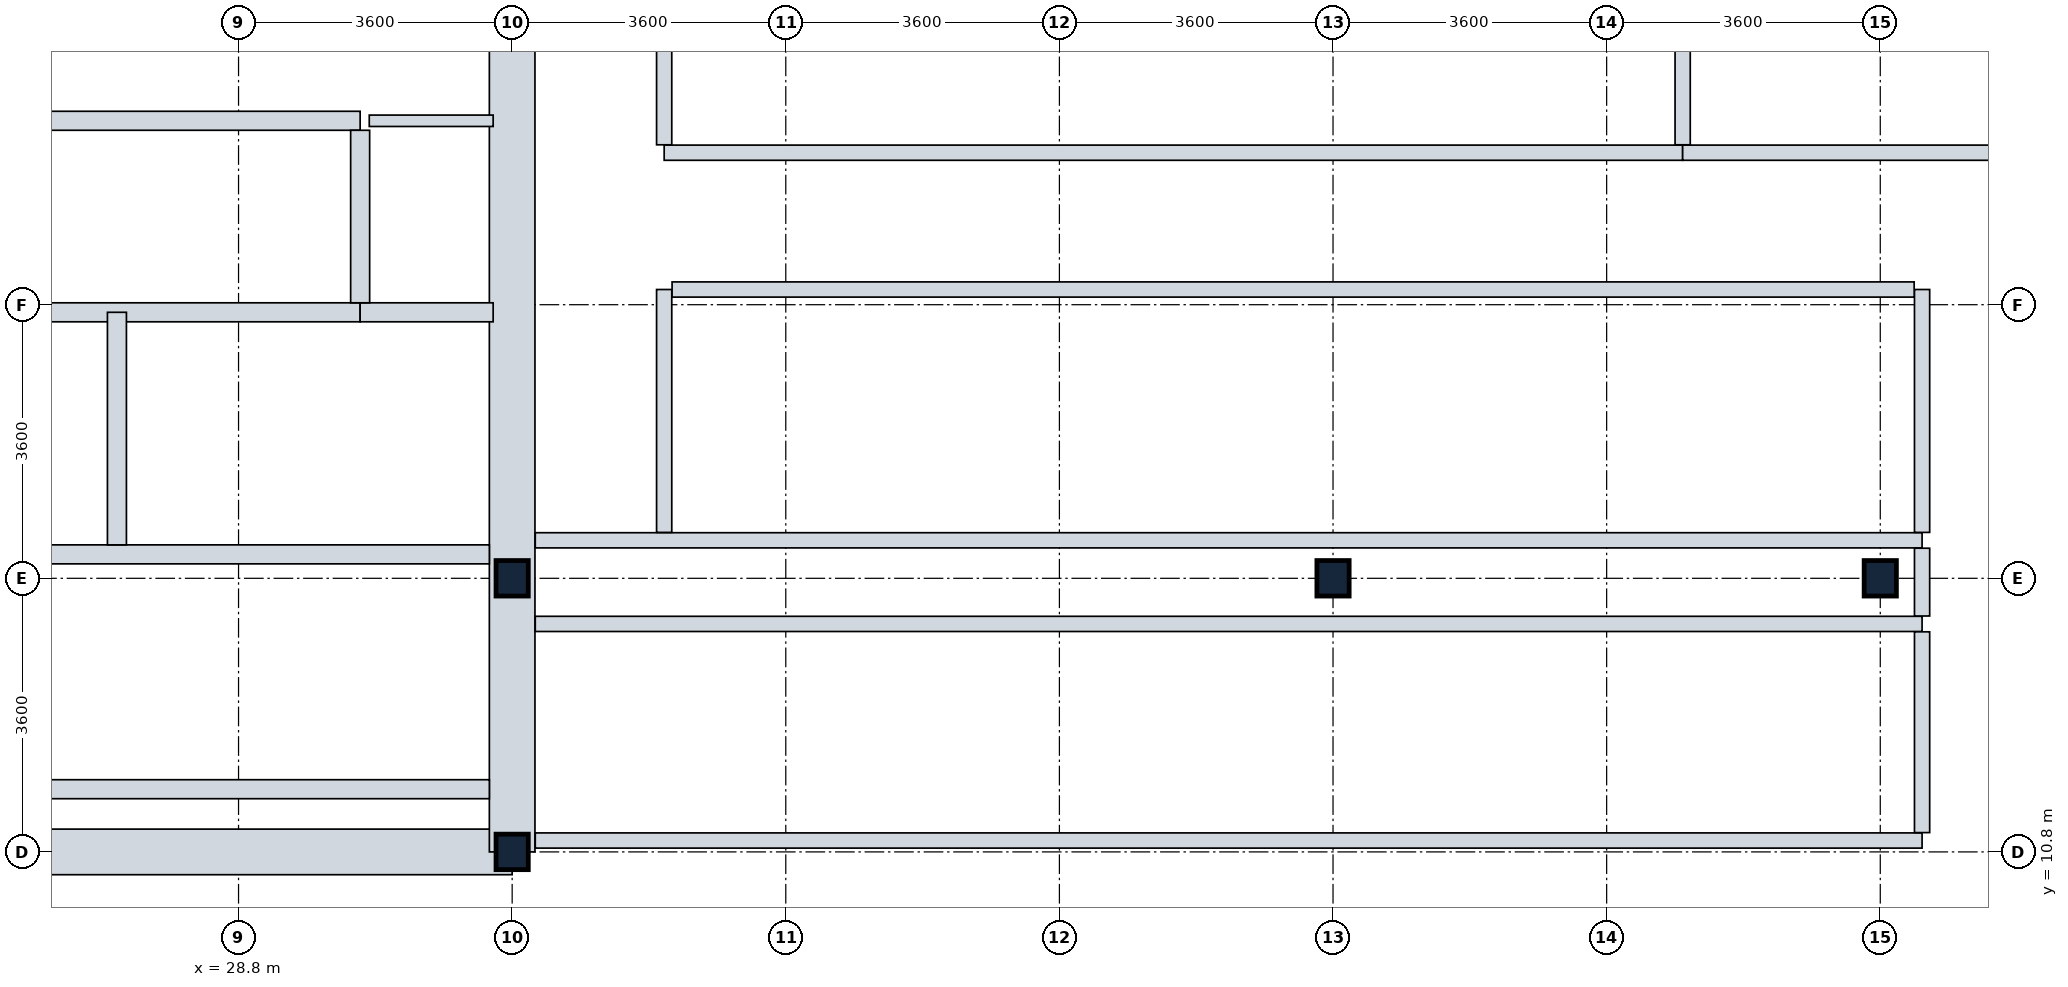
"""IFC4 building model, lengths in metres.
Left out: names, types, materials, properties, quantities, classifications, styles, units other than length and angle.
Written with IfcOpenShell. Run it as: python <this file> out.ifc"""

import sys

from ifc_helpers import new_model, si_unit, direction, frame, frame_2d, origin, origin_2d, place, context, subcontext, project, spatial, rectangle, i_section, extrude, element, fill, save


model = new_model("IFC4")
c1 = context("Model", 3, precision=1e-05, world=origin(), true_north=direction((0.0, 1.0)))
c2 = subcontext(c1, "Body", "Model", "MODEL_VIEW")
j1 = project(units=[si_unit("LENGTHUNIT", "METRE"), si_unit("PLANEANGLEUNIT", "RADIAN")], contexts=[c1])
p1 = place(None, origin())
s1 = spatial("IfcSite", under=j1, at=p1, CompositionType="ELEMENT")
p2 = place(p1, origin())
s2 = spatial("IfcBuilding", under=s1, at=p2, CompositionType="ELEMENT")
p3 = place(p2, frame((0.0, 0.0, 74.7)))
s3 = spatial("IfcBuildingStorey", under=s2, at=p3, CompositionType="ELEMENT", Elevation=74.7)
for number, where, z_axis, x_axis in (
    (1, (32.4, 10.8, 0.0), (0.0, 0.0, 1.0), (1.0, 0.0, 0.0)),
    (2, (32.4, 14.4, 0.0), (0.0, 0.0, 1.0), (1.0, 0.0, 0.0)),
    (3, (43.2, 14.4, 0.0), (0.0, 0.0, 1.0), (1.0, 0.0, 0.0)),
    (4, (50.4, 14.4, 0.0), (0.0, 0.0, 1.0), (1.0, 0.0, 0.0)),
):
    element("IfcColumn", number, at=place(p3, frame(where, z_axis=z_axis, x_axis=x_axis)), inside=s3, PredefinedType="COLUMN", context=c2, shape_type="SweptSolid", body=[
        extrude(i_section(OverallWidth=0.424, OverallDepth=0.467, WebThickness=0.033, FlangeThickness=0.053, FilletRadius=0.015, at=origin_2d()), origin(), (0.0, 0.0, 1.0), 5.4),
    ])
p4 = place(p3, frame((14.4, 10.8, 0.0), z_axis=(0.0, 0.0, 1.0), x_axis=(1.0, 0.0, 0.0)))
e5 = element("IfcWall", 5, at=p4, inside=s3, PredefinedType="SHEAR", context=c2, shape_type="SweptSolid", body=[
    extrude(rectangle(XDim=18.0, YDim=0.6, at=frame_2d((9.0, 0.0))), origin(), (0.0, 0.0, 1.0), 5.08),
])
p5 = place(p3, frame((32.4, 10.8, 0.0), z_axis=(0.0, 0.0, 1.0), x_axis=(0.0, 1.0, 0.0)))
e6 = element("IfcWall", 6, at=p5, inside=s3, PredefinedType="SHEAR", context=c2, shape_type="SweptSolid", body=[
    extrude(rectangle(XDim=14.4, YDim=0.6, at=frame_2d((7.2, 0.0))), origin(), (0.0, 0.0, 1.0), 5.08),
])
p6 = place(p5, frame((4.35, 0.0, 0.0)))
e7 = element("IfcOpeningElement", 7, at=p6, cuts=e6, PredefinedType="OPENING", context=c2, shape_type="SweptSolid", body=[
    extrude(rectangle(XDim=1.2, YDim=2.1, at=frame_2d((0.6, 1.05))), frame((0.0, 0.31, 0.0), z_axis=(0.0, -1.0, 0.0), x_axis=(1.0, 0.0, 0.0)), (0.0, 0.0, 1.0), 0.62),
])
p7 = place(p5, frame((10.0, 0.0, 0.0)))
e8 = element("IfcOpeningElement", 8, at=p7, cuts=e6, PredefinedType="OPENING", context=c2, shape_type="SweptSolid", body=[
    extrude(rectangle(XDim=1.2, YDim=2.1, at=frame_2d((0.6, 1.05))), frame((0.0, 0.31, 0.0), z_axis=(0.0, -1.0, 0.0), x_axis=(1.0, 0.0, 0.0)), (0.0, 0.0, 1.0), 0.62),
])
p8 = place(p3, frame((23.35, 11.625, 0.0), z_axis=(0.0, 0.0, 1.0), x_axis=(1.0, 0.0, 0.0)))
e9 = element("IfcWall", 9, at=p8, inside=s3, PredefinedType="SHEAR", context=c2, shape_type="SweptSolid", body=[
    extrude(rectangle(XDim=8.75, YDim=0.25, at=frame_2d((4.375, 0.0))), origin(), (0.0, 0.0, 1.0), 5.08),
])
p9 = place(p3, frame((23.35, 14.715, 0.0), z_axis=(0.0, 0.0, 1.0), x_axis=(1.0, 0.0, 0.0)))
e10 = element("IfcWall", 10, at=p9, inside=s3, PredefinedType="SHEAR", context=c2, shape_type="SweptSolid", body=[
    extrude(rectangle(XDim=8.75, YDim=0.25, at=frame_2d((4.375, 0.0))), origin(), (0.0, 0.0, 1.0), 5.08),
])
p10 = place(p9, frame((6.775, 0.0, 0.0)))
e11 = element("IfcOpeningElement", 11, at=p10, cuts=e10, PredefinedType="OPENING", context=c2, shape_type="SweptSolid", body=[
    extrude(rectangle(XDim=1.1, YDim=2.1, at=frame_2d((0.55, 1.05))), frame((0.0, 0.135, 0.0), z_axis=(0.0, -1.0, 0.0), x_axis=(1.0, 0.0, 0.0)), (0.0, 0.0, 1.0), 0.27),
])
p11 = place(p3, frame((21.88, 17.9, 0.0), z_axis=(0.0, 0.0, 1.0), x_axis=(1.0, 0.0, 0.0)))
e12 = element("IfcWall", 12, at=p11, inside=s3, PredefinedType="PARTITIONING", context=c2, shape_type="SweptSolid", body=[
    extrude(rectangle(XDim=8.52, YDim=0.25, at=frame_2d((4.26, 0.0))), origin(), (0.0, 0.0, 1.0), 5.065),
])
p12 = place(p3, frame((30.4, 17.9, 0.0), z_axis=(0.0, 0.0, 1.0), x_axis=(1.0, 0.0, 0.0)))
e13 = element("IfcWall", 13, at=p12, inside=s3, PredefinedType="PARTITIONING", context=c2, shape_type="SweptSolid", body=[
    extrude(rectangle(XDim=1.75, YDim=0.25, at=frame_2d((0.875, 0.0))), origin(), (0.0, 0.0, 1.0), 5.065),
])
p13 = place(p12, frame((0.32, 0.0, 0.0)))
e14 = element("IfcOpeningElement", 14, at=p13, cuts=e13, PredefinedType="OPENING", context=c2, shape_type="SweptSolid", body=[
    extrude(rectangle(XDim=1.1, YDim=2.1, at=frame_2d((0.55, 1.05))), frame((0.0, 0.135, 0.0), z_axis=(0.0, -1.0, 0.0), x_axis=(1.0, 0.0, 0.0)), (0.0, 0.0, 1.0), 0.27),
])
p14 = place(p3, frame((27.2, 14.84, 0.0), z_axis=(0.0, 0.0, 1.0), x_axis=(0.0, 1.0, 0.0)))
e15 = element("IfcWall", 15, at=p14, inside=s3, PredefinedType="PARTITIONING", context=c2, shape_type="SweptSolid", body=[
    extrude(rectangle(XDim=3.06, YDim=0.25, at=frame_2d((1.53, 0.0))), origin(), (0.0, 0.0, 1.0), 5.065),
])
p15 = place(p14, frame((0.98, 0.0, 0.0)))
e16 = element("IfcOpeningElement", 16, at=p15, cuts=e15, PredefinedType="OPENING", context=c2, shape_type="SweptSolid", body=[
    extrude(rectangle(XDim=1.1, YDim=2.1, at=frame_2d((0.55, 1.05))), frame((0.0, 0.135, 0.0), z_axis=(0.0, -1.0, 0.0), x_axis=(1.0, 0.0, 0.0)), (0.0, 0.0, 1.0), 0.27),
])
p16 = place(p3, frame((23.18, 20.42, 0.0), z_axis=(0.0, 0.0, 1.0), x_axis=(1.0, 0.0, 0.0)))
e17 = element("IfcWall", 17, at=p16, inside=s3, PredefinedType="PARTITIONING", context=c2, shape_type="SweptSolid", body=[
    extrude(rectangle(XDim=7.22, YDim=0.25, at=frame_2d((3.61, 0.0))), origin(), (0.0, 0.0, 1.0), 5.065),
])
p17 = place(p3, frame((30.4, 18.025, 0.0), z_axis=(0.0, 0.0, 1.0), x_axis=(0.0, 1.0, 0.0)))
e18 = element("IfcWall", 18, at=p17, inside=s3, PredefinedType="PARTITIONING", context=c2, shape_type="SweptSolid", body=[
    extrude(rectangle(XDim=2.27, YDim=0.25, at=frame_2d((1.135, 0.0))), origin(), (0.0, 0.0, 1.0), 5.065),
])
p18 = place(p3, frame((30.52, 20.42, 0.0), z_axis=(0.0, 0.0, 1.0), x_axis=(1.0, 0.0, 0.0)))
e19 = element("IfcWall", 19, at=p18, inside=s3, PredefinedType="PARTITIONING", context=c2, shape_type="SweptSolid", body=[
    extrude(rectangle(XDim=1.63, YDim=0.15, at=frame_2d((0.815, 0.0))), origin(), (0.0, 0.0, 1.0), 5.065),
])
p19 = place(p18, frame((0.38, 0.0, 0.0)))
e20 = element("IfcOpeningElement", 20, at=p19, cuts=e19, PredefinedType="OPENING", context=c2, shape_type="SweptSolid", body=[
    extrude(rectangle(XDim=0.85, YDim=2.1, at=frame_2d((0.425, 1.05))), frame((0.0, 0.085, 0.0), z_axis=(0.0, -1.0, 0.0), x_axis=(1.0, 0.0, 0.0)), (0.0, 0.0, 1.0), 0.17),
])
for number, where, z_axis, x_axis in (
    (21, (32.704, 13.8, 0.0), (0.0, 0.0, 1.0), (1.0, 0.0, 0.0)),
    (22, (32.704, 14.9, 0.0), (0.0, 0.0, 1.0), (1.0, 0.0, 0.0)),
):
    element("IfcWall", number, at=place(p3, frame(where, z_axis=z_axis, x_axis=x_axis)), inside=s3, PredefinedType="PARTITIONING", context=c2, shape_type="SweptSolid", body=[
        extrude(rectangle(XDim=18.246, YDim=0.2, at=frame_2d((9.123, 0.0))), origin(), (0.0, 0.0, 1.0), 3.58),
    ])
p20 = place(p3, frame((50.95, 13.904, 0.0), z_axis=(0.0, 0.0, 1.0), x_axis=(0.0, 1.0, 0.0)))
e23 = element("IfcWall", 23, at=p20, inside=s3, PredefinedType="PARTITIONING", context=c2, shape_type="SweptSolid", body=[
    extrude(rectangle(XDim=0.892, YDim=0.2, at=frame_2d((0.446, 0.0))), origin(), (0.0, 0.0, 1.0), 3.58),
])
for number, where, z_axis, x_axis in (
    (24, (34.4, 15.004, 0.0), (0.0, 0.0, 1.0), (0.0, 1.0, 0.0)),
    (25, (50.95, 15.004, 0.0), (0.0, 0.0, 1.0), (0.0, 1.0, 0.0)),
):
    element("IfcWall", number, at=place(p3, frame(where, z_axis=z_axis, x_axis=x_axis)), inside=s3, PredefinedType="PARTITIONING", context=c2, shape_type="SweptSolid", body=[
        extrude(rectangle(XDim=3.196, YDim=0.2, at=frame_2d((1.598, 0.0))), origin(), (0.0, 0.0, 1.0), 3.58),
    ])
p21 = place(p3, frame((34.504, 18.2, 0.0), z_axis=(0.0, 0.0, 1.0), x_axis=(1.0, 0.0, 0.0)))
e26 = element("IfcWall", 26, at=p21, inside=s3, PredefinedType="PARTITIONING", context=c2, shape_type="SweptSolid", body=[
    extrude(rectangle(XDim=16.342, YDim=0.2, at=frame_2d((8.171, 0.0))), origin(), (0.0, 0.0, 1.0), 4.61),
])
p22 = place(p21, frame((7.631, 0.0, 0.0)))
e27 = element("IfcOpeningElement", 27, at=p22, cuts=e26, PredefinedType="OPENING", context=c2, shape_type="SweptSolid", body=[
    extrude(rectangle(XDim=1.0, YDim=2.1, at=frame_2d((0.5, 1.05))), frame((0.0, 0.11, 0.0), z_axis=(0.0, -1.0, 0.0), x_axis=(1.0, 0.0, 0.0)), (0.0, 0.0, 1.0), 0.22),
])
p23 = place(p3, frame((34.4, 20.0, 0.0), z_axis=(0.0, 0.0, 1.0), x_axis=(1.0, 0.0, 0.0)))
e28 = element("IfcWall", 28, at=p23, inside=s3, PredefinedType="PARTITIONING", context=c2, shape_type="SweptSolid", body=[
    extrude(rectangle(XDim=13.4, YDim=0.2, at=frame_2d((6.7, 0.0))), origin(), (0.0, 0.0, 1.0), 4.61),
])
p24 = place(p23, frame((5.8, 0.0, 0.0)))
e29 = element("IfcOpeningElement", 29, at=p24, cuts=e28, PredefinedType="OPENING", context=c2, shape_type="SweptSolid", body=[
    extrude(rectangle(XDim=1.8, YDim=2.2, at=frame_2d((0.9, 1.1))), frame((0.0, 0.11, 0.0), z_axis=(0.0, -1.0, 0.0), x_axis=(1.0, 0.0, 0.0)), (0.0, 0.0, 1.0), 0.22),
])
p25 = place(p3, frame((47.8, 20.0, 0.0), z_axis=(0.0, 0.0, 1.0), x_axis=(1.0, 0.0, 0.0)))
e30 = element("IfcWall", 30, at=p25, inside=s3, PredefinedType="PARTITIONING", context=c2, shape_type="SweptSolid", body=[
    extrude(rectangle(XDim=13.246, YDim=0.2, at=frame_2d((6.623, 0.0))), origin(), (0.0, 0.0, 1.0), 3.58),
])
p26 = place(p25, frame((6.2, 0.0, 0.0)))
e31 = element("IfcOpeningElement", 31, at=p26, cuts=e30, PredefinedType="OPENING", context=c2, shape_type="SweptSolid", body=[
    extrude(rectangle(XDim=1.0, YDim=2.1, at=frame_2d((0.5, 1.05))), frame((0.0, 0.11, 0.0), z_axis=(0.0, -1.0, 0.0), x_axis=(1.0, 0.0, 0.0)), (0.0, 0.0, 1.0), 0.22),
])
p27 = place(p3, frame((34.4, 20.104, 0.0), z_axis=(0.0, 0.0, 1.0), x_axis=(0.0, 1.0, 0.0)))
e32 = element("IfcWall", 32, at=p27, inside=s3, PredefinedType="PARTITIONING", context=c2, shape_type="SweptSolid", body=[
    extrude(rectangle(XDim=4.942, YDim=0.2, at=frame_2d((2.471, 0.0))), origin(), (0.0, 0.0, 1.0), 4.43),
])
p28 = place(p3, frame((47.8, 20.104, 0.0), z_axis=(0.0, 0.0, 1.0), x_axis=(0.0, 1.0, 0.0)))
e33 = element("IfcWall", 33, at=p28, inside=s3, PredefinedType="PARTITIONING", context=c2, shape_type="SweptSolid", body=[
    extrude(rectangle(XDim=5.096, YDim=0.2, at=frame_2d((2.548, 0.0))), origin(), (0.0, 0.0, 1.0), 4.43),
])
p29 = place(p3, frame((32.704, 10.95, 0.0), z_axis=(0.0, 0.0, 1.0), x_axis=(1.0, 0.0, 0.0)))
e34 = element("IfcWall", 34, at=p29, inside=s3, PredefinedType="PARTITIONING", context=c2, shape_type="SweptSolid", body=[
    extrude(rectangle(XDim=18.246, YDim=0.2, at=frame_2d((9.123, 0.0))), origin(), (0.0, 0.0, 1.0), 4.61),
])
p30 = place(p29, frame((8.471, 0.0, 0.0)))
e35 = element("IfcOpeningElement", 35, at=p30, cuts=e34, PredefinedType="OPENING", context=c2, shape_type="SweptSolid", body=[
    extrude(rectangle(XDim=1.0, YDim=2.1, at=frame_2d((0.5, 1.05))), frame((0.0, 0.11, 0.0), z_axis=(0.0, -1.0, 0.0), x_axis=(1.0, 0.0, 0.0)), (0.0, 0.0, 1.0), 0.22),
])
p31 = place(p3, frame((50.95, 11.054, 0.0), z_axis=(0.0, 0.0, 1.0), x_axis=(0.0, 1.0, 0.0)))
e36 = element("IfcWall", 36, at=p31, inside=s3, PredefinedType="PARTITIONING", context=c2, shape_type="SweptSolid", body=[
    extrude(rectangle(XDim=2.642, YDim=0.2, at=frame_2d((1.321, 0.0))), origin(), (0.0, 0.0, 1.0), 5.065),
])
p32 = place(p10, origin())
e37 = element("IfcDoor", 37, at=p32, inside=s3, OperationType="SINGLE_SWING_LEFT", PredefinedType="DOOR", context=c2, shape_type="SweptSolid", body=[
    extrude(rectangle(XDim=1.1, YDim=2.1, at=frame_2d((0.55, 1.05))), frame((0.0, 0.025, 0.0), z_axis=(0.0, -1.0, 0.0), x_axis=(1.0, 0.0, 0.0)), (0.0, 0.0, 1.0), 0.05),
])
fill(e11, e37)
p33 = place(p15, origin())
e38 = element("IfcDoor", 38, at=p33, inside=s3, OperationType="SLIDING_TO_LEFT", PredefinedType="DOOR", context=c2, shape_type="SweptSolid", body=[
    extrude(rectangle(XDim=1.1, YDim=2.1, at=frame_2d((0.55, 1.05))), frame((0.0, 0.025, 0.0), z_axis=(0.0, -1.0, 0.0), x_axis=(1.0, 0.0, 0.0)), (0.0, 0.0, 1.0), 0.05),
])
fill(e16, e38)
p34 = place(p6, origin())
e39 = element("IfcDoor", 39, at=p34, inside=s3, OperationType="SINGLE_SWING_LEFT", PredefinedType="DOOR", context=c2, shape_type="SweptSolid", body=[
    extrude(rectangle(XDim=1.2, YDim=2.1, at=frame_2d((0.6, 1.05))), frame((0.0, 0.025, 0.0), z_axis=(0.0, -1.0, 0.0), x_axis=(1.0, 0.0, 0.0)), (0.0, 0.0, 1.0), 0.05),
])
fill(e7, e39)
p35 = place(p13, origin())
e40 = element("IfcDoor", 40, at=p35, inside=s3, OperationType="SINGLE_SWING_LEFT", PredefinedType="DOOR", context=c2, shape_type="SweptSolid", body=[
    extrude(rectangle(XDim=1.1, YDim=2.1, at=frame_2d((0.55, 1.05))), frame((0.0, 0.025, 0.0), z_axis=(0.0, -1.0, 0.0), x_axis=(1.0, 0.0, 0.0)), (0.0, 0.0, 1.0), 0.05),
])
fill(e14, e40)
p36 = place(p7, origin())
e41 = element("IfcDoor", 41, at=p36, inside=s3, OperationType="SINGLE_SWING_RIGHT", PredefinedType="DOOR", context=c2, shape_type="SweptSolid", body=[
    extrude(rectangle(XDim=1.2, YDim=2.1, at=frame_2d((0.6, 1.05))), frame((0.0, 0.025, 0.0), z_axis=(0.0, -1.0, 0.0), x_axis=(1.0, 0.0, 0.0)), (0.0, 0.0, 1.0), 0.05),
])
fill(e8, e41)
p37 = place(p19, origin())
e42 = element("IfcDoor", 42, at=p37, inside=s3, OperationType="SINGLE_SWING_LEFT", PredefinedType="DOOR", context=c2, shape_type="SweptSolid", body=[
    extrude(rectangle(XDim=0.85, YDim=2.1, at=frame_2d((0.425, 1.05))), frame((0.0, 0.025, 0.0), z_axis=(0.0, -1.0, 0.0), x_axis=(1.0, 0.0, 0.0)), (0.0, 0.0, 1.0), 0.05),
])
fill(e20, e42)
p38 = place(p22, origin())
e43 = element("IfcDoor", 43, at=p38, inside=s3, OperationType="SINGLE_SWING_LEFT", PredefinedType="DOOR", context=c2, shape_type="SweptSolid", body=[
    extrude(rectangle(XDim=1.0, YDim=2.1, at=frame_2d((0.5, 1.05))), frame((0.0, 0.025, 0.0), z_axis=(0.0, -1.0, 0.0), x_axis=(1.0, 0.0, 0.0)), (0.0, 0.0, 1.0), 0.05),
])
fill(e27, e43)
p39 = place(p24, origin())
e44 = element("IfcDoor", 44, at=p39, inside=s3, OperationType="DOUBLE_DOOR_SINGLE_SWING", PredefinedType="DOOR", context=c2, shape_type="SweptSolid", body=[
    extrude(rectangle(XDim=1.8, YDim=2.2, at=frame_2d((0.9, 1.1))), frame((0.0, 0.025, 0.0), z_axis=(0.0, -1.0, 0.0), x_axis=(1.0, 0.0, 0.0)), (0.0, 0.0, 1.0), 0.05),
])
fill(e29, e44)
p40 = place(p30, origin())
e45 = element("IfcDoor", 45, at=p40, inside=s3, OperationType="SINGLE_SWING_LEFT", PredefinedType="DOOR", context=c2, shape_type="SweptSolid", body=[
    extrude(rectangle(XDim=1.0, YDim=2.1, at=frame_2d((0.5, 1.05))), frame((0.0, 0.025, 0.0), z_axis=(0.0, -1.0, 0.0), x_axis=(1.0, 0.0, 0.0)), (0.0, 0.0, 1.0), 0.05),
])
fill(e35, e45)
save(model, sys.argv[1])
